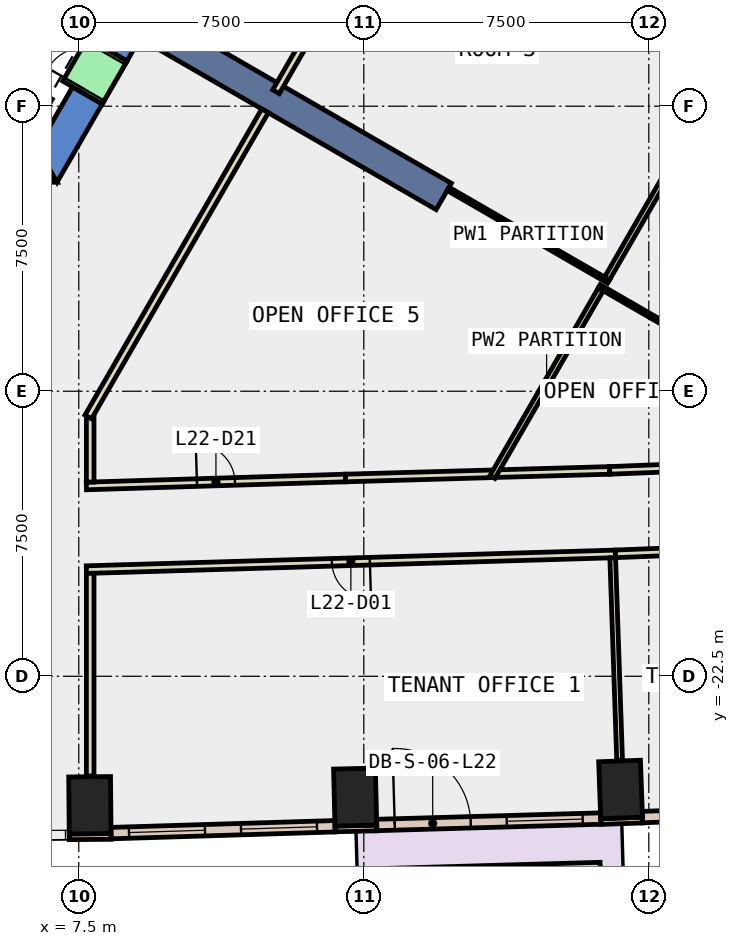
"""IFC4 building model, lengths in metres.
Left out: names, types, materials, properties, quantities, classifications, styles, units other than length and angle.
Written with IfcOpenShell. Run it as: python <this file> out.ifc"""

import sys

from ifc_helpers import new_model, si_unit, direction, frame, frame_2d, origin, origin_2d, place, context, subcontext, project, spatial, polyline, rectangle, outline, extrude, element, fill, save


model = new_model("IFC4")
c1 = context("Model", 3, precision=1e-05, world=origin(), true_north=direction((0.0, 1.0)))
c2 = subcontext(c1, "Body", "Model", "MODEL_VIEW")
j1 = project(units=[si_unit("LENGTHUNIT", "METRE"), si_unit("PLANEANGLEUNIT", "RADIAN")], contexts=[c1])
p1 = place(None, origin())
s1 = spatial("IfcSite", under=j1, at=p1, CompositionType="ELEMENT")
p2 = place(p1, origin())
s2 = spatial("IfcBuilding", under=s1, at=p2, CompositionType="ELEMENT")
p3 = place(p2, frame((0.0, 0.0, 103.4)))
s3 = spatial("IfcBuildingStorey", under=s2, at=p3, CompositionType="ELEMENT", Elevation=103.4)
for number, where, z_axis, x_axis in (
    (1, (7.792, -25.894, -0.4), (0.0, 0.0, 1.0), (1.0, 0.009, 0.0)),
    (2, (14.773, -25.679, -0.4), (0.0, 0.0, 1.0), (1.0, 0.024, 0.0)),
    (3, (21.757, -25.479, -0.4), (0.0, 0.0, 1.0), (0.999, 0.035, 0.0)),
):
    element("IfcColumn", number, at=place(p3, frame(where, z_axis=z_axis, x_axis=x_axis)), inside=s3, PredefinedType="COLUMN", context=c2, shape_type="SweptSolid", body=[
        extrude(rectangle(XDim=1.1, YDim=1.5, at=origin_2d()), origin(), (0.0, 0.0, 1.0), 4.2),
    ])
p4 = place(p3, frame((0.0, 0.0, -0.4)))
e4 = element("IfcWall", 4, at=p4, inside=s3, PredefinedType="SHEAR", context=c2, shape_type="SweptSolid", body=[
    extrude(outline(polyline([(5.75, -8.6), (5.75, -9.5), (6.928, -9.5), (6.409, -8.6), (5.75, -8.6)])), origin(), (0.0, 0.0, 1.0), 4.2),
])
p5 = place(p3, frame((0.0, 0.0, -0.4)))
e5 = element("IfcWall", 5, at=p5, inside=s3, PredefinedType="SHEAR", context=c2, shape_type="SweptSolid", body=[
    extrude(outline(polyline([(8.117, -7.44), (7.338, -6.99), (6.409, -8.6), (6.928, -9.5), (8.117, -7.44)])), origin(), (0.0, 0.0, 1.0), 4.2),
])
p6 = place(p3, frame((0.0, 0.0, -0.4)))
e6 = element("IfcWall", 6, at=p6, inside=s3, PredefinedType="SHEAR", context=c2, shape_type="SweptSolid", body=[
    extrude(outline(polyline([(9.417, -5.189), (8.638, -4.739), (7.988, -5.864), (8.767, -6.314), (9.417, -5.189)])), origin(), (0.0, 0.0, 1.0), 4.2),
])
p7 = place(p3, frame((0.0, 0.0, 3.6)))
e7 = element("IfcWall", 7, at=p7, inside=s3, PredefinedType="SHEAR", context=c2, shape_type="SweptSolid", body=[
    extrude(outline(polyline([(8.767, -6.314), (7.988, -5.864), (7.338, -6.99), (8.117, -7.44), (8.767, -6.314)])), origin(), (0.0, 0.0, 1.0), 0.2),
])
p8 = place(p3, frame((9.31, -5.375, -0.4), z_axis=(0.0, 0.0, 1.0), x_axis=(0.866017533419, -0.500013631625, 0.0)))
e8 = element("IfcWall", 8, at=p8, inside=s3, PredefinedType="SHEAR", context=c2, shape_type="SweptSolid", body=[
    extrude(rectangle(XDim=9.0, YDim=0.8, at=frame_2d((4.5, 0.0))), origin(), (0.0, 0.0, 1.0), 4.2),
])
p9 = place(p3, frame((7.249, -26.724, 0.0), z_axis=(0.0, 0.0, 1.0), x_axis=(0.99995860686, 0.009098602504, 0.0)))
e9 = element("IfcWall", 9, at=p9, inside=s3, PredefinedType="STANDARD", context=c2, shape_type="SweptSolid", body=[
    extrude(rectangle(XDim=1.1, YDim=0.15, at=frame_2d((0.55, 0.0))), origin(), (0.0, 0.0, 1.0), 3.8),
])
p10 = place(p3, frame((14.243, -26.517, 0.0), z_axis=(0.0, 0.0, 1.0), x_axis=(0.999718180159, 0.023739424163, 0.0)))
e10 = element("IfcWall", 10, at=p10, inside=s3, PredefinedType="STANDARD", context=c2, shape_type="SweptSolid", body=[
    extrude(rectangle(XDim=1.1, YDim=0.15, at=frame_2d((0.55, 0.0))), origin(), (0.0, 0.0, 1.0), 3.8),
])
p11 = place(p3, frame((21.237, -26.323, 0.0), z_axis=(0.0, 0.0, 1.0), x_axis=(0.999368780235, 0.035525217693, 0.0)))
e11 = element("IfcWall", 11, at=p11, inside=s3, PredefinedType="STANDARD", context=c2, shape_type="SweptSolid", body=[
    extrude(rectangle(XDim=1.1, YDim=0.15, at=frame_2d((0.55, 0.0))), origin(), (0.0, 0.0, 1.0), 3.8),
])
p12 = place(p3, frame((8.347, -26.627, 0.0), z_axis=(0.0, 0.0, 1.0), x_axis=(0.999529601824, 0.030668796478, 0.0)))
e12 = element("IfcWall", 12, at=p12, inside=s3, PredefinedType="STANDARD", context=c2, shape_type="SweptSolid", body=[
    extrude(rectangle(XDim=5.899, YDim=0.3, at=frame_2d((2.949, 0.0))), origin(), (0.0, 0.0, 1.0), 3.8),
])
p13 = place(p12, frame((0.475, 0.0, 0.9)))
e13 = element("IfcOpeningElement", 13, at=p13, cuts=e12, PredefinedType="OPENING", context=c2, shape_type="SweptSolid", body=[
    extrude(rectangle(XDim=2.0, YDim=2.6, at=frame_2d((1.0, 1.3))), frame((0.0, 0.16, 0.0), z_axis=(0.0, -1.0, 0.0), x_axis=(1.0, 0.0, 0.0)), (0.0, 0.0, 1.0), 0.32),
])
p14 = place(p12, frame((3.424, 0.0, 0.9)))
e14 = element("IfcOpeningElement", 14, at=p14, cuts=e12, PredefinedType="OPENING", context=c2, shape_type="SweptSolid", body=[
    extrude(rectangle(XDim=2.0, YDim=2.6, at=frame_2d((1.0, 1.3))), frame((0.0, 0.16, 0.0), z_axis=(0.0, -1.0, 0.0), x_axis=(1.0, 0.0, 0.0)), (0.0, 0.0, 1.0), 0.32),
])
p15 = place(p3, frame((15.34, -26.413, 0.0), z_axis=(0.0, 0.0, 1.0), x_axis=(0.999588397616, 0.028688592709, 0.0)))
e15 = element("IfcWall", 15, at=p15, inside=s3, PredefinedType="STANDARD", context=c2, shape_type="SweptSolid", body=[
    extrude(rectangle(XDim=5.897, YDim=0.3, at=frame_2d((2.949, 0.0))), origin(), (0.0, 0.0, 1.0), 3.8),
])
p16 = place(p15, frame((0.474, 0.0, 0.0)))
e16 = element("IfcOpeningElement", 16, at=p16, cuts=e15, PredefinedType="OPENING", context=c2, shape_type="SweptSolid", body=[
    extrude(rectangle(XDim=2.0, YDim=2.4, at=frame_2d((1.0, 1.2))), frame((0.0, 0.16, 0.0), z_axis=(0.0, -1.0, 0.0), x_axis=(1.0, 0.0, 0.0)), (0.0, 0.0, 1.0), 0.32),
])
p17 = place(p15, frame((3.423, 0.0, 0.9)))
e17 = element("IfcOpeningElement", 17, at=p17, cuts=e15, PredefinedType="OPENING", context=c2, shape_type="SweptSolid", body=[
    extrude(rectangle(XDim=2.0, YDim=2.6, at=frame_2d((1.0, 1.3))), frame((0.0, 0.16, 0.0), z_axis=(0.0, -1.0, 0.0), x_axis=(1.0, 0.0, 0.0)), (0.0, 0.0, 1.0), 0.32),
])
p18 = place(p3, frame((22.332, -26.206, 0.0), z_axis=(0.0, 0.0, 1.0), x_axis=(0.99922113396, 0.039460428885, 0.0)))
e18 = element("IfcWall", 18, at=p18, inside=s3, PredefinedType="STANDARD", context=c2, shape_type="SweptSolid", body=[
    extrude(rectangle(XDim=5.878, YDim=0.3, at=frame_2d((2.939, 0.0))), origin(), (0.0, 0.0, 1.0), 3.8),
])
p19 = place(p18, frame((0.469, 0.0, 0.9)))
e19 = element("IfcOpeningElement", 19, at=p19, cuts=e18, PredefinedType="OPENING", context=c2, shape_type="SweptSolid", body=[
    extrude(rectangle(XDim=2.0, YDim=2.6, at=frame_2d((1.0, 1.3))), frame((0.0, 0.16, 0.0), z_axis=(0.0, -1.0, 0.0), x_axis=(1.0, 0.0, 0.0)), (0.0, 0.0, 1.0), 0.32),
])
p20 = place(p18, frame((3.408, 0.0, 0.9)))
e20 = element("IfcOpeningElement", 20, at=p20, cuts=e18, PredefinedType="OPENING", context=c2, shape_type="SweptSolid", body=[
    extrude(rectangle(XDim=2.0, YDim=2.6, at=frame_2d((1.0, 1.3))), frame((0.0, 0.16, 0.0), z_axis=(0.0, -1.0, 0.0), x_axis=(1.0, 0.0, 0.0)), (0.0, 0.0, 1.0), 0.32),
])
p21 = place(p3, frame((15.435, -27.961, 0.0), z_axis=(0.0, 0.0, 1.0), x_axis=(0.999589746939, 0.028641540027, 0.0)))
e21 = element("IfcWall", 21, at=p21, inside=s3, PredefinedType="STANDARD", context=c2, shape_type="SweptSolid", body=[
    extrude(rectangle(XDim=5.796, YDim=0.8, at=frame_2d((2.898, 0.0))), origin(), (0.0, 0.0, 1.0), 0.8),
])
p22 = place(p3, frame((7.7, -17.493, 0.0), z_axis=(0.0, 0.0, 1.0), x_axis=(0.999526319751, 0.030775576778, 0.0)))
e22 = element("IfcWall", 22, at=p22, inside=s3, PredefinedType="PARTITIONING", context=c2, shape_type="SweptSolid", body=[
    extrude(rectangle(XDim=6.822, YDim=0.2, at=frame_2d((3.411, 0.0))), origin(), (0.0, 0.0, 1.0), 3.8),
])
p23 = place(p22, frame((2.911, 0.0, 0.0)))
e23 = element("IfcOpeningElement", 23, at=p23, cuts=e22, PredefinedType="OPENING", context=c2, shape_type="SweptSolid", body=[
    extrude(rectangle(XDim=1.0, YDim=2.1, at=frame_2d((0.5, 1.05))), frame((0.0, 0.11, 0.0), z_axis=(0.0, -1.0, 0.0), x_axis=(1.0, 0.0, 0.0)), (0.0, 0.0, 1.0), 0.22),
])
p24 = place(p3, frame((14.519, -17.283, 0.0), z_axis=(0.0, 0.0, 1.0), x_axis=(0.999591204998, 0.028590608419, 0.0)))
e24 = element("IfcWall", 24, at=p24, inside=s3, PredefinedType="PARTITIONING", context=c2, shape_type="SweptSolid", body=[
    extrude(rectangle(XDim=3.843, YDim=0.2, at=frame_2d((1.921, 0.0))), origin(), (0.0, 0.0, 1.0), 3.8),
])
p25 = place(p3, frame((24.051, -7.315, 0.0), z_axis=(0.0, 0.0, 1.0), x_axis=(-0.475308630647, 0.87981913234, 0.0)))
e25 = element("IfcWall", 25, at=p25, inside=s3, PredefinedType="PARTITIONING", context=c2, shape_type="SweptSolid", body=[
    extrude(rectangle(XDim=4.166, YDim=0.2, at=frame_2d((2.083, 0.0))), origin(), (0.0, 0.0, 1.0), 3.8),
])
p26 = place(p3, frame((18.509, -17.168, 0.0), z_axis=(0.0, 0.0, 1.0), x_axis=(0.999588854267, 0.028672677323, 0.0)))
e26 = element("IfcWall", 26, at=p26, inside=s3, PredefinedType="PARTITIONING", context=c2, shape_type="SweptSolid", body=[
    extrude(rectangle(XDim=2.963, YDim=0.2, at=frame_2d((1.481, 0.0))), origin(), (0.0, 0.0, 1.0), 3.8),
])
p27 = place(p3, frame((21.471, -17.083, 0.0), z_axis=(0.0, 0.0, 1.0), x_axis=(0.999221407079, 0.039453512338, 0.0)))
e27 = element("IfcWall", 27, at=p27, inside=s3, PredefinedType="PARTITIONING", context=c2, shape_type="SweptSolid", body=[
    extrude(rectangle(XDim=6.083, YDim=0.2, at=frame_2d((3.042, 0.0))), origin(), (0.0, 0.0, 1.0), 3.8),
])
p28 = place(p27, frame((2.541, 0.0, 0.0)))
e28 = element("IfcOpeningElement", 28, at=p28, cuts=e27, PredefinedType="OPENING", context=c2, shape_type="SweptSolid", body=[
    extrude(rectangle(XDim=1.0, YDim=2.1, at=frame_2d((0.5, 1.05))), frame((0.0, 0.11, 0.0), z_axis=(0.0, -1.0, 0.0), x_axis=(1.0, 0.0, 0.0)), (0.0, 0.0, 1.0), 0.22),
])
p29 = place(p3, frame((21.621, -19.28, 0.0), z_axis=(0.0, 0.0, 1.0), x_axis=(-0.999557957525, -0.029730280001, 0.0)))
e29 = element("IfcWall", 29, at=p29, inside=s3, PredefinedType="PARTITIONING", context=c2, shape_type="SweptSolid", body=[
    extrude(rectangle(XDim=13.927, YDim=0.2, at=frame_2d((6.964, 0.0))), origin(), (0.0, 0.0, 1.0), 3.8),
])
p30 = place(p29, frame((6.464, 0.0, 0.0)))
e30 = element("IfcOpeningElement", 30, at=p30, cuts=e29, PredefinedType="OPENING", context=c2, shape_type="SweptSolid", body=[
    extrude(rectangle(XDim=1.0, YDim=2.1, at=frame_2d((0.5, 1.05))), frame((0.0, 0.11, 0.0), z_axis=(0.0, -1.0, 0.0), x_axis=(1.0, 0.0, 0.0)), (0.0, 0.0, 1.0), 0.22),
])
p31 = place(p3, frame((27.865, -19.032, 0.0), z_axis=(0.0, 0.0, 1.0), x_axis=(-0.999218029978, -0.039538950003, 0.0)))
e31 = element("IfcWall", 31, at=p31, inside=s3, PredefinedType="PARTITIONING", context=c2, shape_type="SweptSolid", body=[
    extrude(rectangle(XDim=6.249, YDim=0.2, at=frame_2d((3.125, 0.0))), origin(), (0.0, 0.0, 1.0), 3.8),
])
p32 = place(p31, frame((2.699, 0.0, 0.0)))
e32 = element("IfcOpeningElement", 32, at=p32, cuts=e31, PredefinedType="OPENING", context=c2, shape_type="SweptSolid", body=[
    extrude(rectangle(XDim=1.0, YDim=2.1, at=frame_2d((0.5, 1.05))), frame((0.0, 0.11, 0.0), z_axis=(0.0, -1.0, 0.0), x_axis=(1.0, 0.0, 0.0)), (0.0, 0.0, 1.0), 0.22),
])
p33 = place(p3, frame((7.8, -15.69, 0.0), z_axis=(0.0, 0.0, 1.0), x_axis=(0.0, -1.0, 0.0)))
e33 = element("IfcWall", 33, at=p33, inside=s3, PredefinedType="PARTITIONING", context=c2, shape_type="SweptSolid", body=[
    extrude(rectangle(XDim=1.7, YDim=0.2, at=frame_2d((0.85, 0.0))), origin(), (0.0, 0.0, 1.0), 3.8),
])
p34 = place(p3, frame((7.8, -19.791, 0.0), z_axis=(0.0, 0.0, 1.0), x_axis=(0.0, -1.0, 0.0)))
e34 = element("IfcWall", 34, at=p34, inside=s3, PredefinedType="PARTITIONING", context=c2, shape_type="SweptSolid", body=[
    extrude(rectangle(XDim=5.333, YDim=0.2, at=frame_2d((2.667, 0.0))), origin(), (0.0, 0.0, 1.0), 3.8),
])
p35 = place(p3, frame((12.401, -7.621, 0.0), z_axis=(0.0, 0.0, 1.0), x_axis=(-0.499983724212, -0.866034800411, 0.0)))
e35 = element("IfcWall", 35, at=p35, inside=s3, PredefinedType="PARTITIONING", context=c2, shape_type="SweptSolid", body=[
    extrude(rectangle(XDim=9.302, YDim=0.2, at=frame_2d((4.651, 0.0))), origin(), (0.0, 0.0, 1.0), 3.8),
])
p36 = place(p3, frame((18.503, 2.949, 0.0), z_axis=(0.0, 0.0, 1.0), x_axis=(-0.49997390151, -0.86604047123, 0.0)))
e36 = element("IfcWall", 36, at=p36, inside=s3, PredefinedType="PARTITIONING", context=c2, shape_type="SweptSolid", body=[
    extrude(rectangle(XDim=11.626, YDim=0.2, at=frame_2d((5.813, 0.0))), origin(), (0.0, 0.0, 1.0), 3.8),
])
p37 = place(p3, frame((17.219, -9.676, 0.0), z_axis=(0.0, 0.0, 1.0), x_axis=(0.86598459596, -0.500070674565, 0.0)))
e37 = element("IfcWall", 37, at=p37, inside=s3, PredefinedType="PARTITIONING", context=c2, shape_type="SweptSolid", body=[
    extrude(rectangle(XDim=4.875, YDim=0.1, at=frame_2d((2.438, 0.0))), origin(), (0.0, 0.0, 1.0), 3.8),
])
p38 = place(p3, frame((21.236, -12.319, 0.0), z_axis=(0.0, 0.0, 1.0), x_axis=(-0.500016488359, -0.866015884017, 0.0)))
e38 = element("IfcWall", 38, at=p38, inside=s3, PredefinedType="PARTITIONING", context=c2, shape_type="SweptSolid", body=[
    extrude(rectangle(XDim=5.702, YDim=0.15, at=frame_2d((2.851, 0.0))), origin(), (0.0, 0.0, 1.0), 3.8),
])
p39 = place(p3, frame((24.137, -7.294, 0.0), z_axis=(0.0, 0.0, 1.0), x_axis=(-0.500001804394, -0.866024362014, 0.0)))
e39 = element("IfcWall", 39, at=p39, inside=s3, PredefinedType="PARTITIONING", context=c2, shape_type="SweptSolid", body=[
    extrude(rectangle(XDim=5.472, YDim=0.15, at=frame_2d((2.736, 0.0))), origin(), (0.0, 0.0, 1.0), 3.8),
])
p40 = place(p3, frame((21.196, -12.238, 0.0), z_axis=(0.0, 0.0, 1.0), x_axis=(0.866023145199, -0.500003911965, 0.0)))
e40 = element("IfcWall", 40, at=p40, inside=s3, PredefinedType="PARTITIONING", context=c2, shape_type="SweptSolid", body=[
    extrude(rectangle(XDim=8.71, YDim=0.1, at=frame_2d((4.355, 0.0))), origin(), (0.0, 0.0, 1.0), 3.8),
])
p41 = place(p3, frame((21.55, -19.382, 0.0), z_axis=(0.0, 0.0, 1.0), x_axis=(0.034124666577, -0.999417583961, 0.0)))
e41 = element("IfcWall", 41, at=p41, inside=s3, PredefinedType="PARTITIONING", context=c2, shape_type="SweptSolid", body=[
    extrude(rectangle(XDim=5.33, YDim=0.15, at=frame_2d((2.665, 0.0))), origin(), (0.0, 0.0, 1.0), 3.8),
])
p42 = place(p3, frame((4.451, -6.19, 0.0), z_axis=(0.0, 0.0, 1.0), x_axis=(0.50000090737, 0.866024879913, 0.0)))
e42 = element("IfcWall", 42, at=p42, inside=s3, PredefinedType="STANDARD", context=c2, shape_type="SweptSolid", body=[
    extrude(rectangle(XDim=10.6, YDim=0.2, at=frame_2d((5.3, 0.0))), origin(), (0.0, 0.0, 1.0), 3.8),
])
p43 = place(p3, frame((4.588, -6.153, 0.0), z_axis=(0.0, 0.0, 1.0), x_axis=(0.866022959057, -0.500004234368, 0.0)))
e43 = element("IfcWall", 43, at=p43, inside=s3, PredefinedType="STANDARD", context=c2, shape_type="SweptSolid", body=[
    extrude(rectangle(XDim=2.5, YDim=0.2, at=frame_2d((1.25, 0.0))), origin(), (0.0, 0.0, 1.0), 3.8),
])
p44 = place(p3, frame((7.598, -7.14, 0.0), z_axis=(0.0, 0.0, 1.0), x_axis=(0.500362116554, 0.865816234728, 0.0)))
e44 = element("IfcWall", 44, at=p44, inside=s3, PredefinedType="STANDARD", context=c2, shape_type="SweptSolid", body=[
    extrude(rectangle(XDim=1.299, YDim=1.2, at=frame_2d((0.65, 0.0))), origin(), (0.0, 0.0, 1.0), 2.4),
])
p45 = place(p44, frame((0.1, 0.0, 0.0)))
e45 = element("IfcOpeningElement", 45, at=p45, cuts=e44, PredefinedType="OPENING", context=c2, shape_type="SweptSolid", body=[
    extrude(rectangle(XDim=1.1, YDim=2.3, at=frame_2d((0.55, 1.15))), frame((0.0, 0.61, 0.0), z_axis=(0.0, -1.0, 0.0), x_axis=(1.0, 0.0, 0.0)), (0.0, 0.0, 1.0), 1.22),
])
p46 = place(p13, origin())
e46 = element("IfcWindow", 46, at=p46, inside=s3, PartitioningType="SINGLE_PANEL", PredefinedType="WINDOW", context=c2, shape_type="SweptSolid", body=[
    extrude(rectangle(XDim=2.0, YDim=2.6, at=frame_2d((1.0, 1.3))), frame((0.0, 0.03, 0.0), z_axis=(0.0, -1.0, 0.0), x_axis=(1.0, 0.0, 0.0)), (0.0, 0.0, 1.0), 0.06),
])
fill(e13, e46)
p47 = place(p14, origin())
e47 = element("IfcWindow", 47, at=p47, inside=s3, PartitioningType="SINGLE_PANEL", PredefinedType="WINDOW", context=c2, shape_type="SweptSolid", body=[
    extrude(rectangle(XDim=2.0, YDim=2.6, at=frame_2d((1.0, 1.3))), frame((0.0, 0.03, 0.0), z_axis=(0.0, -1.0, 0.0), x_axis=(1.0, 0.0, 0.0)), (0.0, 0.0, 1.0), 0.06),
])
fill(e14, e47)
p48 = place(p16, origin())
e48 = element("IfcDoor", 48, at=p48, inside=s3, OperationType="SLIDING_TO_LEFT", PredefinedType="DOOR", context=c2, shape_type="SweptSolid", body=[
    extrude(rectangle(XDim=2.0, YDim=2.4, at=frame_2d((1.0, 1.2))), frame((0.0, 0.025, 0.0), z_axis=(0.0, -1.0, 0.0), x_axis=(1.0, 0.0, 0.0)), (0.0, 0.0, 1.0), 0.05),
])
fill(e16, e48)
p49 = place(p17, origin())
e49 = element("IfcWindow", 49, at=p49, inside=s3, PartitioningType="SINGLE_PANEL", PredefinedType="WINDOW", context=c2, shape_type="SweptSolid", body=[
    extrude(rectangle(XDim=2.0, YDim=2.6, at=frame_2d((1.0, 1.3))), frame((0.0, 0.03, 0.0), z_axis=(0.0, -1.0, 0.0), x_axis=(1.0, 0.0, 0.0)), (0.0, 0.0, 1.0), 0.06),
])
fill(e17, e49)
p50 = place(p30, origin())
e50 = element("IfcDoor", 50, at=p50, inside=s3, OperationType="SINGLE_SWING_LEFT", PredefinedType="DOOR", context=c2, shape_type="SweptSolid", body=[
    extrude(rectangle(XDim=1.0, YDim=2.1, at=frame_2d((0.5, 1.05))), frame((0.0, 0.025, 0.0), z_axis=(0.0, -1.0, 0.0), x_axis=(1.0, 0.0, 0.0)), (0.0, 0.0, 1.0), 0.05),
])
fill(e30, e50)
p51 = place(p23, origin())
e51 = element("IfcDoor", 51, at=p51, inside=s3, OperationType="SINGLE_SWING_LEFT", PredefinedType="DOOR", context=c2, shape_type="SweptSolid", body=[
    extrude(rectangle(XDim=1.0, YDim=2.1, at=frame_2d((0.5, 1.05))), frame((0.0, 0.025, 0.0), z_axis=(0.0, -1.0, 0.0), x_axis=(1.0, 0.0, 0.0)), (0.0, 0.0, 1.0), 0.05),
])
fill(e23, e51)
p52 = place(p45, origin())
e52 = element("IfcDoor", 52, at=p52, inside=s3, OperationType="SLIDING_TO_LEFT", PredefinedType="DOOR", context=c2, shape_type="SweptSolid", body=[
    extrude(rectangle(XDim=1.1, YDim=2.3, at=frame_2d((0.55, 1.15))), frame((0.0, 0.025, 0.0), z_axis=(0.0, -1.0, 0.0), x_axis=(1.0, 0.0, 0.0)), (0.0, 0.0, 1.0), 0.05),
])
fill(e45, e52)
save(model, sys.argv[1])
